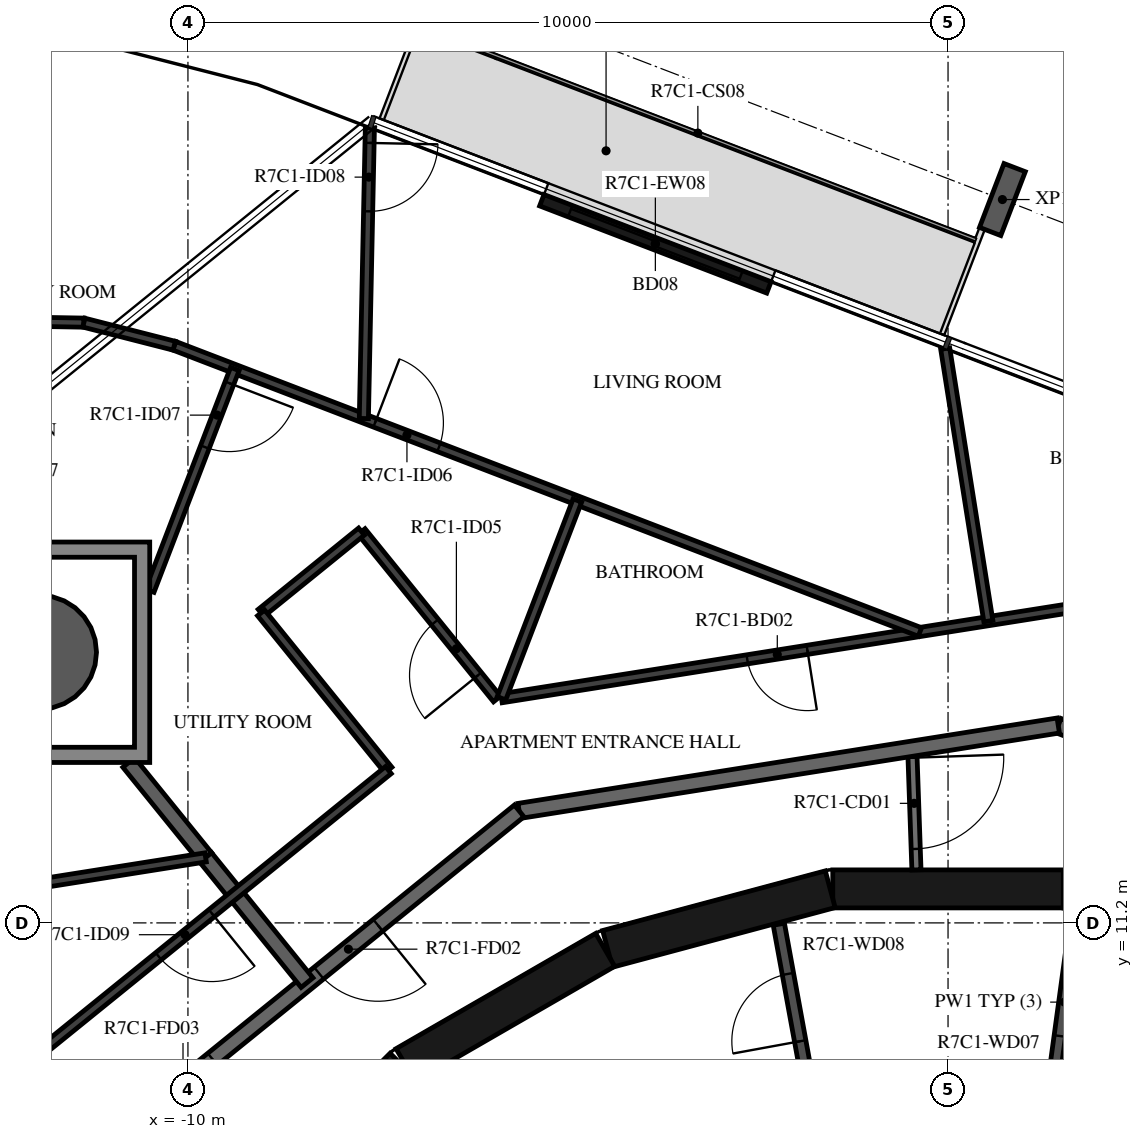
"""IFC4 building model, lengths in metres.
Left out: names, types, materials, properties, quantities, classifications, styles, units other than length and angle.
Written with IfcOpenShell. Run it as: python <this file> out.ifc"""

import sys

from ifc_helpers import new_model, si_unit, direction, frame, frame_2d, origin, origin_2d, place, context, subcontext, project, spatial, polyline, rectangle, hollow_circle, i_section, outline, extrude, element, fill, save


model = new_model("IFC4")
c1 = context("Model", 3, precision=1e-05, world=origin(), true_north=direction((0.0, 1.0)))
c2 = subcontext(c1, "Body", "Model", "MODEL_VIEW")
j1 = project(units=[si_unit("LENGTHUNIT", "METRE"), si_unit("PLANEANGLEUNIT", "RADIAN")], contexts=[c1])
p1 = place(None, origin())
s1 = spatial("IfcSite", under=j1, at=p1, CompositionType="ELEMENT")
p2 = place(p1, origin())
s2 = spatial("IfcBuilding", under=s1, at=p2, CompositionType="ELEMENT")
p3 = place(p2, frame((0.0, 0.0, 287.9)))
s3 = spatial("IfcBuildingStorey", under=s2, at=p3, CompositionType="ELEMENT", Elevation=287.9)
p4 = place(p3, frame((-11.953, 14.76, -0.38), z_axis=(0.0, 0.0, 1.0), x_axis=(1.0, 0.0, 0.0)))
e1 = element("IfcColumn", 1, at=p4, inside=s3, PredefinedType="COLUMN", context=c2, shape_type="SweptSolid", body=[
    extrude(hollow_circle(Radius=0.75, WallThickness=0.035, at=origin_2d()), origin(), (0.0, 0.0, 1.0), 2.616),
])
p5 = place(p3, frame((0.715, 20.716, -0.38), z_axis=(0.0, 0.0, 1.0), x_axis=(0.933580354843, -0.35836813621, 0.0)))
e2 = element("IfcColumn", 2, at=p5, inside=s3, PredefinedType="COLUMN", context=c2, shape_type="SweptSolid", body=[
    extrude(i_section(OverallWidth=0.3, OverallDepth=0.9, WebThickness=0.019, FlangeThickness=0.035, FilletRadius=0.03, at=origin_2d()), origin(), (0.0, 0.0, 1.0), 2.616),
])
p6 = place(p3, frame((-2.357, 19.56, 0.0), z_axis=(0.0, 0.0, 1.0), x_axis=(-0.933553885508, 0.358437083534, 0.0)))
e3 = element("IfcWall", 3, at=p6, inside=s3, PredefinedType="STANDARD", context=c2, shape_type="SweptSolid", body=[
    extrude(rectangle(XDim=3.2, YDim=0.16, at=frame_2d((1.6, 0.0))), origin(), (0.0, 0.0, 1.0), 3.05),
])
p7 = place(p6, frame((0.4, 0.0, 0.0)))
e4 = element("IfcOpeningElement", 4, at=p7, cuts=e3, PredefinedType="OPENING", context=c2, shape_type="SweptSolid", body=[
    extrude(rectangle(XDim=2.4, YDim=2.4, at=frame_2d((1.2, 1.2))), frame((0.0, 0.09, 0.0), z_axis=(0.0, -1.0, 0.0), x_axis=(1.0, 0.0, 0.0)), (0.0, 0.0, 1.0), 0.18),
])
for number, where, z_axis, x_axis in (
    (5, (4.479, 10.858, 0.0), (0.0, 0.0, 1.0), (-0.966, 0.259, 0.0)),
    (6, (1.516, 11.647, 0.0), (0.0, 0.0, 1.0), (-1.0, 0.0, 0.0)),
    (7, (-1.55, 11.643, 0.0), (0.0, 0.0, 1.0), (-0.966, -0.259, 0.0)),
    (8, (-4.51, 10.845, 0.0), (0.0, 0.0, 1.0), (-0.866, -0.5, 0.0)),
):
    element("IfcWall", number, at=place(p3, frame(where, z_axis=z_axis, x_axis=x_axis)), inside=s3, PredefinedType="SHEAR", context=c2, shape_type="SweptSolid", body=[
        extrude(rectangle(XDim=3.033, YDim=0.5, at=frame_2d((1.516, 0.0))), origin(), (0.0, 0.0, 1.0), 3.05),
    ])
p8 = place(p3, frame((-7.164, 9.308, 0.0), z_axis=(0.0, 0.0, 1.0), x_axis=(-0.707106781187, -0.707106781187, 0.0)))
e9 = element("IfcWall", 9, at=p8, inside=s3, PredefinedType="SHEAR", context=c2, shape_type="SweptSolid", body=[
    extrude(rectangle(XDim=3.032, YDim=0.5, at=frame_2d((1.516, 0.0))), origin(), (0.0, 0.0, 1.0), 3.05),
])
p9 = place(p8, frame((1.416, 0.0, 0.0)))
e10 = element("IfcOpeningElement", 10, at=p9, cuts=e9, PredefinedType="OPENING", context=c2, shape_type="SweptSolid", body=[
    extrude(rectangle(XDim=1.2, YDim=2.1, at=frame_2d((0.6, 1.05))), frame((0.0, 0.26, 0.0), z_axis=(0.0, -1.0, 0.0), x_axis=(1.0, 0.0, 0.0)), (0.0, 0.0, 1.0), 0.52),
])
p10 = place(p3, frame((1.691, 11.326, 0.0), z_axis=(0.0, 0.0, 1.0), x_axis=(-0.135344253201, -0.990798633994, 0.0)))
e11 = element("IfcWall", 11, at=p10, inside=s3, PredefinedType="PARTITIONING", context=c2, shape_type="SweptSolid", body=[
    extrude(rectangle(XDim=2.358, YDim=0.15, at=frame_2d((1.179, 0.0))), origin(), (0.0, 0.0, 1.0), 3.05),
])
p11 = place(p10, frame((0.729, 0.0, 0.0)))
e12 = element("IfcOpeningElement", 12, at=p11, cuts=e11, PredefinedType="OPENING", context=c2, shape_type="SweptSolid", body=[
    extrude(rectangle(XDim=0.9, YDim=2.1, at=frame_2d((0.45, 1.05))), frame((0.0, 0.085, 0.0), z_axis=(0.0, -1.0, 0.0), x_axis=(1.0, 0.0, 0.0)), (0.0, 0.0, 1.0), 0.17),
])
p12 = place(p3, frame((-1.825, 8.99, 0.0), z_axis=(0.0, 0.0, 1.0), x_axis=(-0.179955206115, 0.983674805915, 0.0)))
e13 = element("IfcWall", 13, at=p12, inside=s3, PredefinedType="PARTITIONING", context=c2, shape_type="SweptSolid", body=[
    extrude(rectangle(XDim=2.229, YDim=0.15, at=frame_2d((1.115, 0.0))), origin(), (0.0, 0.0, 1.0), 3.05),
])
p13 = place(p12, frame((0.665, 0.0, 0.0)))
e14 = element("IfcOpeningElement", 14, at=p13, cuts=e13, PredefinedType="OPENING", context=c2, shape_type="SweptSolid", body=[
    extrude(rectangle(XDim=0.9, YDim=2.1, at=frame_2d((0.45, 1.05))), frame((0.0, 0.085, 0.0), z_axis=(0.0, -1.0, 0.0), x_axis=(1.0, 0.0, 0.0)), (0.0, 0.0, 1.0), 0.17),
])
p14 = place(p3, frame((-0.471, 13.492, 0.0), z_axis=(0.0, 0.0, 1.0), x_axis=(0.034873173869, -0.999391745886, 0.0)))
e15 = element("IfcWall", 15, at=p14, inside=s3, PredefinedType="PARTITIONING", context=c2, shape_type="SweptSolid", body=[
    extrude(rectangle(XDim=1.596, YDim=0.12, at=frame_2d((0.798, 0.0))), origin(), (0.0, 0.0, 1.0), 3.05),
])
p15 = place(p14, frame((0.12, 0.0, 0.0)))
e16 = element("IfcOpeningElement", 16, at=p15, cuts=e15, PredefinedType="OPENING", context=c2, shape_type="SweptSolid", body=[
    extrude(rectangle(XDim=1.2, YDim=2.1, at=frame_2d((0.6, 1.05))), frame((0.0, 0.07, 0.0), z_axis=(0.0, -1.0, 0.0), x_axis=(1.0, 0.0, 0.0)), (0.0, 0.0, 1.0), 0.14),
])
p16 = place(p3, frame((8.154, 11.223, 0.0), z_axis=(0.0, 0.0, 1.0), x_axis=(-0.93359073609, 0.358341090983, 0.0)))
e17 = element("IfcWall", 17, at=p16, inside=s3, PredefinedType="STANDARD", context=c2, shape_type="SweptSolid", body=[
    extrude(rectangle(XDim=7.181, YDim=0.2, at=frame_2d((3.59, 0.0))), origin(), (0.0, 0.0, 1.0), 3.05),
])
p17 = place(p3, frame((1.45, 13.797, 0.0), z_axis=(0.0, 0.0, 1.0), x_axis=(-0.987690361611, -0.156421704315, 0.0)))
e18 = element("IfcWall", 18, at=p17, inside=s3, PredefinedType="STANDARD", context=c2, shape_type="SweptSolid", body=[
    extrude(rectangle(XDim=7.181, YDim=0.2, at=frame_2d((3.591, 0.0))), origin(), (0.0, 0.0, 1.0), 3.05),
])
p18 = place(p3, frame((-5.643, 12.673, 0.0), z_axis=(0.0, 0.0, 1.0), x_axis=(-0.777160148113, -0.629302871585, 0.0)))
e19 = element("IfcWall", 19, at=p18, inside=s3, PredefinedType="STANDARD", context=c2, shape_type="SweptSolid", body=[
    extrude(rectangle(XDim=7.181, YDim=0.2, at=frame_2d((3.59, 0.0))), origin(), (0.0, 0.0, 1.0), 3.05),
])
p19 = place(p18, frame((2.39, 0.0, 0.0)))
e20 = element("IfcOpeningElement", 20, at=p19, cuts=e19, PredefinedType="OPENING", context=c2, shape_type="SweptSolid", body=[
    extrude(rectangle(XDim=1.0, YDim=2.1, at=frame_2d((0.5, 1.05))), frame((0.0, 0.11, 0.0), z_axis=(0.0, -1.0, 0.0), x_axis=(1.0, 0.0, 0.0)), (0.0, 0.0, 1.0), 0.22),
])
p20 = place(p18, frame((5.19, 0.0, 0.0)))
e21 = element("IfcOpeningElement", 21, at=p20, cuts=e19, PredefinedType="OPENING", context=c2, shape_type="SweptSolid", body=[
    extrude(rectangle(XDim=1.0, YDim=2.1, at=frame_2d((0.5, 1.05))), frame((0.0, 0.11, 0.0), z_axis=(0.0, -1.0, 0.0), x_axis=(1.0, 0.0, 0.0)), (0.0, 0.0, 1.0), 0.22),
])
p21 = place(p3, frame((-9.768, 12.062, 0.0), z_axis=(0.0, 0.0, 1.0), x_axis=(0.629274383598, -0.777183215302, 0.0)))
e22 = element("IfcWall", 22, at=p21, inside=s3, PredefinedType="STANDARD", context=c2, shape_type="SweptSolid", body=[
    extrude(rectangle(XDim=2.121, YDim=0.2, at=frame_2d((1.061, 0.0))), origin(), (0.0, 0.0, 1.0), 3.05),
])
p22 = place(p3, frame((-10.779, 13.311, 0.0), z_axis=(0.0, 0.0, 1.0), x_axis=(0.629373100483, -0.77710327524, 0.0)))
e23 = element("IfcWall", 23, at=p22, inside=s3, PredefinedType="STANDARD", context=c2, shape_type="SweptSolid", body=[
    extrude(rectangle(XDim=1.606, YDim=0.2, at=frame_2d((0.803, 0.0))), origin(), (0.0, 0.0, 1.0), 3.05),
])
p23 = place(p3, frame((1.612, 15.341, 0.0), z_axis=(0.0, 0.0, 1.0), x_axis=(-0.987690790621, -0.156418995404, 0.0)))
e24 = element("IfcWall", 24, at=p23, inside=s3, PredefinedType="PARTITIONING", context=c2, shape_type="SweptSolid", body=[
    extrude(rectangle(XDim=7.581, YDim=0.12, at=frame_2d((3.791, 0.0))), origin(), (0.0, 0.0, 1.0), 3.05),
])
p24 = place(p23, frame((3.507, 0.0, 0.0)))
e25 = element("IfcOpeningElement", 25, at=p24, cuts=e24, PredefinedType="OPENING", context=c2, shape_type="SweptSolid", body=[
    extrude(rectangle(XDim=0.8, YDim=2.1, at=frame_2d((0.4, 1.05))), frame((0.0, 0.07, 0.0), z_axis=(0.0, -1.0, 0.0), x_axis=(1.0, 0.0, 0.0)), (0.0, 0.0, 1.0), 0.14),
])
p25 = place(p3, frame((-5.933, 14.146, 0.0), z_axis=(0.0, 0.0, 1.0), x_axis=(-0.62930727886, 0.777156579316, 0.0)))
e26 = element("IfcWall", 26, at=p25, inside=s3, PredefinedType="PARTITIONING", context=c2, shape_type="SweptSolid", body=[
    extrude(rectangle(XDim=2.833, YDim=0.12, at=frame_2d((1.417, 0.0))), origin(), (0.0, 0.0, 1.0), 3.05),
])
p26 = place(p25, frame((0.4, 0.0, 0.0)))
e27 = element("IfcOpeningElement", 27, at=p26, cuts=e26, PredefinedType="OPENING", context=c2, shape_type="SweptSolid", body=[
    extrude(rectangle(XDim=0.9, YDim=2.1, at=frame_2d((0.45, 1.05))), frame((0.0, 0.07, 0.0), z_axis=(0.0, -1.0, 0.0), x_axis=(1.0, 0.0, 0.0)), (0.0, 0.0, 1.0), 0.14),
])
p27 = place(p3, frame((-7.717, 16.348, 0.0), z_axis=(0.0, 0.0, 1.0), x_axis=(-0.777184671515, -0.629272585103, 0.0)))
e28 = element("IfcWall", 28, at=p27, inside=s3, PredefinedType="PARTITIONING", context=c2, shape_type="SweptSolid", body=[
    extrude(rectangle(XDim=1.7, YDim=0.12, at=frame_2d((0.85, 0.0))), origin(), (0.0, 0.0, 1.0), 3.05),
])
p28 = place(p3, frame((-9.038, 15.278, 0.0), z_axis=(0.0, 0.0, 1.0), x_axis=(0.629338090938, -0.777131628037, 0.0)))
e29 = element("IfcWall", 29, at=p28, inside=s3, PredefinedType="PARTITIONING", context=c2, shape_type="SweptSolid", body=[
    extrude(rectangle(XDim=2.661, YDim=0.12, at=frame_2d((1.331, 0.0))), origin(), (0.0, 0.0, 1.0), 3.05),
])
p29 = place(p3, frame((-7.363, 13.21, 0.0), z_axis=(0.0, 0.0, 1.0), x_axis=(-0.777139504663, -0.629328364443, 0.0)))
e30 = element("IfcWall", 30, at=p29, inside=s3, PredefinedType="PARTITIONING", context=c2, shape_type="SweptSolid", body=[
    extrude(rectangle(XDim=6.584, YDim=0.12, at=frame_2d((3.292, 0.0))), origin(), (0.0, 0.0, 1.0), 3.05),
])
p30 = place(p29, frame((2.991, 0.0, 0.0)))
e31 = element("IfcOpeningElement", 31, at=p30, cuts=e30, PredefinedType="OPENING", context=c2, shape_type="SweptSolid", body=[
    extrude(rectangle(XDim=0.9, YDim=2.1, at=frame_2d((0.45, 1.05))), frame((0.0, 0.07, 0.0), z_axis=(0.0, -1.0, 0.0), x_axis=(1.0, 0.0, 0.0)), (0.0, 0.0, 1.0), 0.14),
])
p31 = place(p3, frame((-0.037, 18.756, 0.0), z_axis=(0.0, 0.0, 1.0), x_axis=(0.156421851095, -0.987690338365, 0.0)))
e32 = element("IfcWall", 32, at=p31, inside=s3, PredefinedType="PARTITIONING", context=c2, shape_type="SweptSolid", body=[
    extrude(rectangle(XDim=3.63, YDim=0.12, at=frame_2d((1.815, 0.0))), origin(), (0.0, 0.0, 1.0), 3.05),
])
p32 = place(p3, frame((-10.18, 18.793, 0.0), z_axis=(0.0, 0.0, 1.0), x_axis=(0.933574148929, -0.358384302742, 0.0)))
e33 = element("IfcWall", 33, at=p32, inside=s3, PredefinedType="PARTITIONING", context=c2, shape_type="SweptSolid", body=[
    extrude(rectangle(XDim=10.509, YDim=0.12, at=frame_2d((5.254, 0.0))), origin(), (0.0, 0.0, 1.0), 3.05),
])
p33 = place(p32, frame((2.829, 0.0, 0.0)))
e34 = element("IfcOpeningElement", 34, at=p33, cuts=e33, PredefinedType="OPENING", context=c2, shape_type="SweptSolid", body=[
    extrude(rectangle(XDim=0.9, YDim=2.1, at=frame_2d((0.45, 1.05))), frame((0.0, 0.07, 0.0), z_axis=(0.0, -1.0, 0.0), x_axis=(1.0, 0.0, 0.0)), (0.0, 0.0, 1.0), 0.14),
])
p34 = place(p3, frame((-7.606, 21.661, 0.0), z_axis=(0.0, 0.0, 1.0), x_axis=(-0.020735808663, -0.999784990005, 0.0)))
e35 = element("IfcWall", 35, at=p34, inside=s3, PredefinedType="PARTITIONING", context=c2, shape_type="SweptSolid", body=[
    extrude(rectangle(XDim=3.826, YDim=0.12, at=frame_2d((1.913, 0.0))), origin(), (0.0, 0.0, 1.0), 3.05),
])
p35 = place(p34, frame((0.2, 0.0, 0.0)))
e36 = element("IfcOpeningElement", 36, at=p35, cuts=e35, PredefinedType="OPENING", context=c2, shape_type="SweptSolid", body=[
    extrude(rectangle(XDim=0.9, YDim=2.1, at=frame_2d((0.45, 1.05))), frame((0.0, 0.07, 0.0), z_axis=(0.0, -1.0, 0.0), x_axis=(1.0, 0.0, 0.0)), (0.0, 0.0, 1.0), 0.14),
])
p36 = place(p3, frame((-4.876, 16.757, 0.0), z_axis=(0.0, 0.0, 1.0), x_axis=(-0.358380240487, -0.933575708354, 0.0)))
e37 = element("IfcWall", 37, at=p36, inside=s3, PredefinedType="PARTITIONING", context=c2, shape_type="SweptSolid", body=[
    extrude(rectangle(XDim=2.787, YDim=0.12, at=frame_2d((1.394, 0.0))), origin(), (0.0, 0.0, 1.0), 3.05),
])
p37 = place(p3, frame((-9.383, 18.487, 0.0), z_axis=(0.0, 0.0, 1.0), x_axis=(-0.358340198137, -0.933591078792, 0.0)))
e38 = element("IfcWall", 38, at=p37, inside=s3, PredefinedType="PARTITIONING", context=c2, shape_type="SweptSolid", body=[
    extrude(rectangle(XDim=3.125, YDim=0.12, at=frame_2d((1.562, 0.0))), origin(), (0.0, 0.0, 1.0), 3.05),
])
p38 = place(p37, frame((0.2, 0.0, 0.0)))
e39 = element("IfcOpeningElement", 39, at=p38, cuts=e38, PredefinedType="OPENING", context=c2, shape_type="SweptSolid", body=[
    extrude(rectangle(XDim=0.9, YDim=2.1, at=frame_2d((0.45, 1.05))), frame((0.0, 0.07, 0.0), z_axis=(0.0, -1.0, 0.0), x_axis=(1.0, 0.0, 0.0)), (0.0, 0.0, 1.0), 0.14),
])
p39 = place(p3, frame((-12.385, 19.115, 0.0), z_axis=(0.0, 0.0, 1.0), x_axis=(0.999850255535, -0.017305100577, 0.0)))
e40 = element("IfcWall", 40, at=p39, inside=s3, PredefinedType="PARTITIONING", context=c2, shape_type="SweptSolid", body=[
    extrude(rectangle(XDim=1.016, YDim=0.12, at=frame_2d((0.508, 0.0))), origin(), (0.0, 0.0, 1.0), 3.05),
])
p40 = place(p3, frame((-11.369, 19.097, 0.0), z_axis=(0.0, 0.0, 1.0), x_axis=(0.968877104853, -0.247542230117, 0.0)))
e41 = element("IfcWall", 41, at=p40, inside=s3, PredefinedType="PARTITIONING", context=c2, shape_type="SweptSolid", body=[
    extrude(rectangle(XDim=1.227, YDim=0.12, at=frame_2d((0.613, 0.0))), origin(), (0.0, 0.0, 1.0), 3.05),
])
p41 = place(p3, frame((-15.828, 11.102, 0.0), z_axis=(0.0, 0.0, 1.0), x_axis=(0.98768671358, 0.156444737262, 0.0)))
e42 = element("IfcWall", 42, at=p41, inside=s3, PredefinedType="PARTITIONING", context=c2, shape_type="SweptSolid", body=[
    extrude(rectangle(XDim=6.136, YDim=0.12, at=frame_2d((3.068, 0.0))), origin(), (0.0, 0.0, 1.0), 3.05),
])
p42 = place(p41, frame((0.2, 0.0, 0.0)))
e43 = element("IfcOpeningElement", 43, at=p42, cuts=e42, PredefinedType="OPENING", context=c2, shape_type="SweptSolid", body=[
    extrude(rectangle(XDim=0.9, YDim=2.1, at=frame_2d((0.45, 1.05))), frame((0.0, 0.07, 0.0), z_axis=(0.0, -1.0, 0.0), x_axis=(1.0, 0.0, 0.0)), (0.0, 0.0, 1.0), 0.14),
])
p43 = place(p3, origin())
e44 = element("IfcWall", 44, at=p43, inside=s3, PredefinedType="STANDARD", context=c2, shape_type="SweptSolid", body=[
    extrude(outline(polyline([(-10.503, 16.21), (-10.503, 13.311), (-13.403, 13.311), (-13.403, 16.21), (-10.503, 16.21)]), holes=[polyline([(-13.203, 13.51), (-10.703, 13.51), (-10.703, 16.01), (-13.203, 16.01), (-13.203, 13.51)])]), origin(), (0.0, 0.0, 1.0), 3.05),
])
p44 = place(p7, origin())
e45 = element("IfcDoor", 45, at=p44, inside=s3, OperationType="DOUBLE_DOOR_SLIDING", PredefinedType="DOOR", context=c2, shape_type="SweptSolid", body=[
    extrude(rectangle(XDim=2.4, YDim=2.4, at=frame_2d((1.2, 1.2))), frame((0.0, 0.025, 0.0), z_axis=(0.0, -1.0, 0.0), x_axis=(1.0, 0.0, 0.0)), (0.0, 0.0, 1.0), 0.05),
])
fill(e4, e45)
p45 = place(p11, origin())
e46 = element("IfcDoor", 46, at=p45, inside=s3, OperationType="SINGLE_SWING_LEFT", PredefinedType="DOOR", context=c2, shape_type="SweptSolid", body=[
    extrude(rectangle(XDim=0.9, YDim=2.1, at=frame_2d((0.45, 1.05))), frame((0.0, 0.025, 0.0), z_axis=(0.0, -1.0, 0.0), x_axis=(1.0, 0.0, 0.0)), (0.0, 0.0, 1.0), 0.05),
])
fill(e12, e46)
p46 = place(p13, origin())
e47 = element("IfcDoor", 47, at=p46, inside=s3, OperationType="SINGLE_SWING_RIGHT", PredefinedType="DOOR", context=c2, shape_type="SweptSolid", body=[
    extrude(rectangle(XDim=0.9, YDim=2.1, at=frame_2d((0.45, 1.05))), frame((0.0, 0.025, 0.0), z_axis=(0.0, -1.0, 0.0), x_axis=(1.0, 0.0, 0.0)), (0.0, 0.0, 1.0), 0.05),
])
fill(e14, e47)
p47 = place(p19, origin())
e48 = element("IfcDoor", 48, at=p47, inside=s3, OperationType="SINGLE_SWING_RIGHT", PredefinedType="DOOR", context=c2, shape_type="SweptSolid", body=[
    extrude(rectangle(XDim=1.0, YDim=2.1, at=frame_2d((0.5, 1.05))), frame((0.0, 0.025, 0.0), z_axis=(0.0, -1.0, 0.0), x_axis=(1.0, 0.0, 0.0)), (0.0, 0.0, 1.0), 0.05),
])
fill(e20, e48)
p48 = place(p24, origin())
e49 = element("IfcDoor", 49, at=p48, inside=s3, OperationType="SINGLE_SWING_RIGHT", PredefinedType="DOOR", context=c2, shape_type="SweptSolid", body=[
    extrude(rectangle(XDim=0.8, YDim=2.1, at=frame_2d((0.4, 1.05))), frame((0.0, 0.025, 0.0), z_axis=(0.0, -1.0, 0.0), x_axis=(1.0, 0.0, 0.0)), (0.0, 0.0, 1.0), 0.05),
])
fill(e25, e49)
p49 = place(p26, origin())
e50 = element("IfcDoor", 50, at=p49, inside=s3, OperationType="SINGLE_SWING_RIGHT", PredefinedType="DOOR", context=c2, shape_type="SweptSolid", body=[
    extrude(rectangle(XDim=0.9, YDim=2.1, at=frame_2d((0.45, 1.05))), frame((0.0, 0.025, 0.0), z_axis=(0.0, -1.0, 0.0), x_axis=(1.0, 0.0, 0.0)), (0.0, 0.0, 1.0), 0.05),
])
fill(e27, e50)
p50 = place(p33, origin())
e51 = element("IfcDoor", 51, at=p50, inside=s3, OperationType="SINGLE_SWING_RIGHT", PredefinedType="DOOR", context=c2, shape_type="SweptSolid", body=[
    extrude(rectangle(XDim=0.9, YDim=2.1, at=frame_2d((0.45, 1.05))), frame((0.0, 0.025, 0.0), z_axis=(0.0, -1.0, 0.0), x_axis=(1.0, 0.0, 0.0)), (0.0, 0.0, 1.0), 0.05),
])
fill(e34, e51)
p51 = place(p38, origin())
e52 = element("IfcDoor", 52, at=p51, inside=s3, OperationType="SINGLE_SWING_RIGHT", PredefinedType="DOOR", context=c2, shape_type="SweptSolid", body=[
    extrude(rectangle(XDim=0.9, YDim=2.1, at=frame_2d((0.45, 1.05))), frame((0.0, 0.025, 0.0), z_axis=(0.0, -1.0, 0.0), x_axis=(1.0, 0.0, 0.0)), (0.0, 0.0, 1.0), 0.05),
])
fill(e39, e52)
p52 = place(p35, origin())
e53 = element("IfcDoor", 53, at=p52, inside=s3, OperationType="SINGLE_SWING_RIGHT", PredefinedType="DOOR", context=c2, shape_type="SweptSolid", body=[
    extrude(rectangle(XDim=0.9, YDim=2.1, at=frame_2d((0.45, 1.05))), frame((0.0, 0.025, 0.0), z_axis=(0.0, -1.0, 0.0), x_axis=(1.0, 0.0, 0.0)), (0.0, 0.0, 1.0), 0.05),
])
fill(e36, e53)
p53 = place(p20, origin())
e54 = element("IfcDoor", 54, at=p53, inside=s3, OperationType="SINGLE_SWING_LEFT", PredefinedType="DOOR", context=c2, shape_type="SweptSolid", body=[
    extrude(rectangle(XDim=1.0, YDim=2.1, at=frame_2d((0.5, 1.05))), frame((0.0, 0.025, 0.0), z_axis=(0.0, -1.0, 0.0), x_axis=(1.0, 0.0, 0.0)), (0.0, 0.0, 1.0), 0.05),
])
fill(e21, e54)
p54 = place(p30, origin())
e55 = element("IfcDoor", 55, at=p54, inside=s3, OperationType="SINGLE_SWING_LEFT", PredefinedType="DOOR", context=c2, shape_type="SweptSolid", body=[
    extrude(rectangle(XDim=0.9, YDim=2.1, at=frame_2d((0.45, 1.05))), frame((0.0, 0.025, 0.0), z_axis=(0.0, -1.0, 0.0), x_axis=(1.0, 0.0, 0.0)), (0.0, 0.0, 1.0), 0.05),
])
fill(e31, e55)
p55 = place(p15, origin())
e56 = element("IfcDoor", 56, at=p55, inside=s3, OperationType="DOUBLE_DOOR_SINGLE_SWING", PredefinedType="DOOR", context=c2, shape_type="SweptSolid", body=[
    extrude(rectangle(XDim=1.2, YDim=2.1, at=frame_2d((0.6, 1.05))), frame((0.0, 0.025, 0.0), z_axis=(0.0, -1.0, 0.0), x_axis=(1.0, 0.0, 0.0)), (0.0, 0.0, 1.0), 0.05),
])
fill(e16, e56)
save(model, sys.argv[1])
